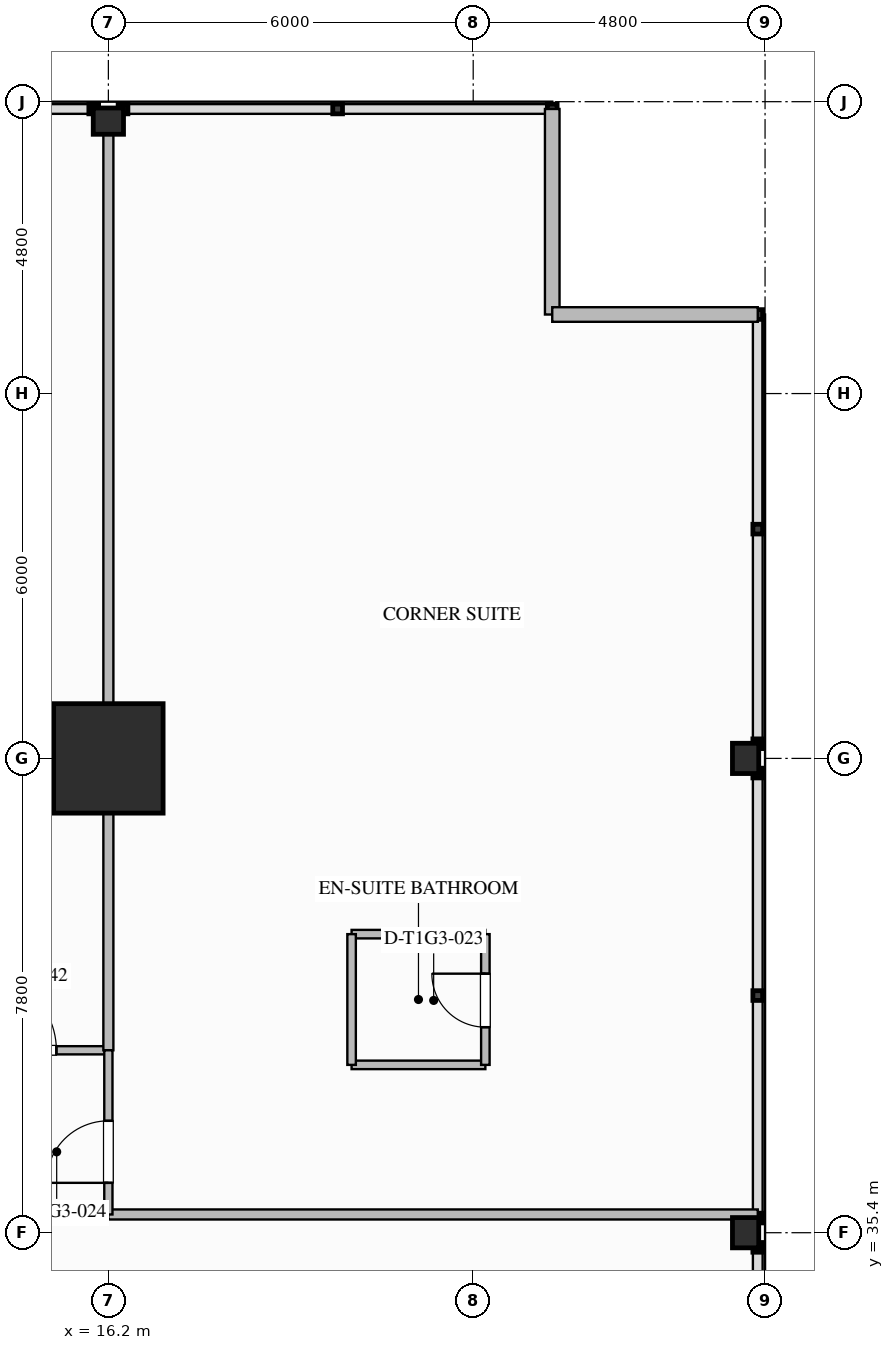
"""IFC4 building model, lengths in metres.
Left out: names, types, materials, properties, quantities, classifications, styles, units other than length and angle.
Written with IfcOpenShell. Run it as: python <this file> out.ifc"""

import sys

from ifc_helpers import new_model, si_unit, direction, frame, frame_2d, origin, origin_2d, place, context, subcontext, project, spatial, rectangle, i_section, extrude, element, fill, save


model = new_model("IFC4")
c1 = context("Model", 3, precision=1e-05, world=origin(), true_north=direction((0.0, 1.0)))
c2 = subcontext(c1, "Body", "Model", "MODEL_VIEW")
j1 = project(units=[si_unit("LENGTHUNIT", "METRE"), si_unit("PLANEANGLEUNIT", "RADIAN")], contexts=[c1])
p1 = place(None, origin())
s1 = spatial("IfcSite", under=j1, at=p1, CompositionType="ELEMENT")
p2 = place(p1, origin())
s2 = spatial("IfcBuilding", under=s1, at=p2, CompositionType="ELEMENT")
p3 = place(p2, frame((0.0, 0.0, 54.2)))
s3 = spatial("IfcBuildingStorey", under=s2, at=p3, CompositionType="ELEMENT", Elevation=54.2)
p4 = place(p3, frame((16.2, 43.2, 0.0), z_axis=(0.0, 0.0, 1.0), x_axis=(1.0, 0.0, 0.0)))
e1 = element("IfcColumn", 1, at=p4, inside=s3, PredefinedType="COLUMN", context=c2, shape_type="SweptSolid", body=[
    extrude(rectangle(XDim=1.8, YDim=1.8, at=origin_2d()), origin(), (0.0, 0.0, 1.0), 3.5),
])
for number, where, z_axis, x_axis in (
    (2, (26.68, 35.4, 0.0), (0.0, 0.0, 1.0), (1.0, 0.0, 0.0)),
    (3, (26.68, 43.2, 0.0), (0.0, 0.0, 1.0), (1.0, 0.0, 0.0)),
    (4, (16.2, 53.68, 0.0), (0.0, 0.0, 1.0), (0.0, 1.0, 0.0)),
):
    element("IfcColumn", number, at=place(p3, frame(where, z_axis=z_axis, x_axis=x_axis)), inside=s3, PredefinedType="COLUMN", context=c2, shape_type="SweptSolid", body=[
        extrude(i_section(OverallWidth=0.432, OverallDepth=0.498, WebThickness=0.056, FlangeThickness=0.089, FilletRadius=0.03, at=origin_2d()), origin(), (0.0, 0.0, 1.0), 3.497),
    ])
for number, where, z_axis, x_axis in (
    (5, (23.5, 53.88, 0.0), (0.0, 0.0, 1.0), (0.0, -1.0, 0.0)),
    (6, (23.5, 50.5, 0.0), (0.0, 0.0, 1.0), (1.0, 0.0, 0.0)),
):
    element("IfcWall", number, at=place(p3, frame(where, z_axis=z_axis, x_axis=x_axis)), inside=s3, PredefinedType="STANDARD", context=c2, shape_type="SweptSolid", body=[
        extrude(rectangle(XDim=3.38, YDim=0.24, at=frame_2d((1.69, 0.0))), origin(), (0.0, 0.0, 1.0), 3.24),
    ])
p5 = place(p3, frame((-16.2, 38.4, 0.0), z_axis=(0.0, 0.0, 1.0), x_axis=(1.0, 0.0, 0.0)))
e7 = element("IfcWall", 7, at=p5, inside=s3, PredefinedType="PARTITIONING", context=c2, shape_type="SweptSolid", body=[
    extrude(rectangle(XDim=32.4, YDim=0.135, at=frame_2d((16.2, 0.0))), origin(), (0.0, 0.0, 1.0), 3.24),
])
p6 = place(p5, frame((4.095, 0.0, 0.0)))
e8 = element("IfcOpeningElement", 8, at=p6, cuts=e7, PredefinedType="OPENING", context=c2, shape_type="SweptSolid", body=[
    extrude(rectangle(XDim=1.26, YDim=2.2, at=frame_2d((0.63, 1.1))), frame((0.0, 0.077, 0.0), z_axis=(0.0, -1.0, 0.0), x_axis=(1.0, 0.0, 0.0)), (0.0, 0.0, 1.0), 0.155),
])
p7 = place(p5, frame((7.875, 0.0, 0.0)))
e9 = element("IfcOpeningElement", 9, at=p7, cuts=e7, PredefinedType="OPENING", context=c2, shape_type="SweptSolid", body=[
    extrude(rectangle(XDim=1.26, YDim=2.2, at=frame_2d((0.63, 1.1))), frame((0.0, 0.077, 0.0), z_axis=(0.0, -1.0, 0.0), x_axis=(1.0, 0.0, 0.0)), (0.0, 0.0, 1.0), 0.155),
])
p8 = place(p5, frame((15.69, 0.0, 0.0)))
e10 = element("IfcOpeningElement", 10, at=p8, cuts=e7, PredefinedType="OPENING", context=c2, shape_type="SweptSolid", body=[
    extrude(rectangle(XDim=1.02, YDim=2.15, at=frame_2d((0.51, 1.075))), frame((0.0, 0.077, 0.0), z_axis=(0.0, -1.0, 0.0), x_axis=(1.0, 0.0, 0.0)), (0.0, 0.0, 1.0), 0.155),
])
p9 = place(p5, frame((21.645, 0.0, 0.0)))
e11 = element("IfcOpeningElement", 11, at=p9, cuts=e7, PredefinedType="OPENING", context=c2, shape_type="SweptSolid", body=[
    extrude(rectangle(XDim=1.26, YDim=2.2, at=frame_2d((0.63, 1.1))), frame((0.0, 0.077, 0.0), z_axis=(0.0, -1.0, 0.0), x_axis=(1.0, 0.0, 0.0)), (0.0, 0.0, 1.0), 0.155),
])
p10 = place(p5, frame((30.285, 0.0, 0.0)))
e12 = element("IfcOpeningElement", 12, at=p10, cuts=e7, PredefinedType="OPENING", context=c2, shape_type="SweptSolid", body=[
    extrude(rectangle(XDim=1.26, YDim=2.2, at=frame_2d((0.63, 1.1))), frame((0.0, 0.077, 0.0), z_axis=(0.0, -1.0, 0.0), x_axis=(1.0, 0.0, 0.0)), (0.0, 0.0, 1.0), 0.155),
])
p11 = place(p3, frame((11.35, 35.7, 0.0), z_axis=(0.0, 0.0, 1.0), x_axis=(1.0, 0.0, 0.0)))
e13 = element("IfcWall", 13, at=p11, inside=s3, PredefinedType="PARTITIONING", context=c2, shape_type="SweptSolid", body=[
    extrude(rectangle(XDim=4.85, YDim=0.135, at=frame_2d((2.425, 0.0))), origin(), (0.0, 0.0, 1.0), 3.24),
])
p12 = place(p3, frame((16.2, 38.4, 0.0), z_axis=(0.0, 0.0, 1.0), x_axis=(0.0, 1.0, 0.0)))
e14 = element("IfcWall", 14, at=p12, inside=s3, PredefinedType="PARTITIONING", context=c2, shape_type="SweptSolid", body=[
    extrude(rectangle(XDim=15.48, YDim=0.165, at=frame_2d((7.74, 0.0))), origin(), (0.0, 0.0, 1.0), 2.298),
])
p13 = place(p3, frame((16.2, 35.7, 0.0), z_axis=(0.0, 0.0, 1.0), x_axis=(1.0, 0.0, 0.0)))
e15 = element("IfcWall", 15, at=p13, inside=s3, PredefinedType="PARTITIONING", context=c2, shape_type="SweptSolid", body=[
    extrude(rectangle(XDim=10.68, YDim=0.165, at=frame_2d((5.34, 0.0))), origin(), (0.0, 0.0, 1.0), 2.298),
])
p14 = place(p3, frame((16.2, 35.7, 0.0), z_axis=(0.0, 0.0, 1.0), x_axis=(0.0, 1.0, 0.0)))
e16 = element("IfcWall", 16, at=p14, inside=s3, PredefinedType="PARTITIONING", context=c2, shape_type="SweptSolid", body=[
    extrude(rectangle(XDim=2.7, YDim=0.135, at=frame_2d((1.35, 0.0))), origin(), (0.0, 0.0, 1.0), 2.298),
])
p15 = place(p14, frame((0.52, 0.0, 0.0)))
e17 = element("IfcOpeningElement", 17, at=p15, cuts=e16, PredefinedType="OPENING", context=c2, shape_type="SweptSolid", body=[
    extrude(rectangle(XDim=1.02, YDim=2.15, at=frame_2d((0.51, 1.075))), frame((0.0, 0.077, 0.0), z_axis=(0.0, -1.0, 0.0), x_axis=(1.0, 0.0, 0.0)), (0.0, 0.0, 1.0), 0.155),
])
for number, where, z_axis, x_axis in (
    (18, (20.2, 38.16, 0.0), (0.0, 0.0, 1.0), (1.0, 0.0, 0.0)),
    (19, (20.2, 40.31, 0.0), (0.0, 0.0, 1.0), (1.0, 0.0, 0.0)),
):
    element("IfcWall", number, at=place(p3, frame(where, z_axis=z_axis, x_axis=x_axis)), inside=s3, PredefinedType="PLUMBINGWALL", context=c2, shape_type="SweptSolid", body=[
        extrude(rectangle(XDim=2.2, YDim=0.14, at=frame_2d((1.1, 0.0))), origin(), (0.0, 0.0, 1.0), 3.24),
    ])
p16 = place(p3, frame((20.2, 38.16, 0.0), z_axis=(0.0, 0.0, 1.0), x_axis=(0.0, 1.0, 0.0)))
e20 = element("IfcWall", 20, at=p16, inside=s3, PredefinedType="PLUMBINGWALL", context=c2, shape_type="SweptSolid", body=[
    extrude(rectangle(XDim=2.15, YDim=0.14, at=frame_2d((1.075, 0.0))), origin(), (0.0, 0.0, 1.0), 3.24),
])
p17 = place(p3, frame((22.4, 38.16, 0.0), z_axis=(0.0, 0.0, 1.0), x_axis=(0.0, 1.0, 0.0)))
e21 = element("IfcWall", 21, at=p17, inside=s3, PredefinedType="PLUMBINGWALL", context=c2, shape_type="SweptSolid", body=[
    extrude(rectangle(XDim=2.15, YDim=0.14, at=frame_2d((1.075, 0.0))), origin(), (0.0, 0.0, 1.0), 3.24),
])
p18 = place(p17, frame((0.62, 0.0, 0.0)))
e22 = element("IfcOpeningElement", 22, at=p18, cuts=e21, PredefinedType="OPENING", context=c2, shape_type="SweptSolid", body=[
    extrude(rectangle(XDim=0.88, YDim=2.1, at=frame_2d((0.44, 1.05))), frame((0.0, 0.08, 0.0), z_axis=(0.0, -1.0, 0.0), x_axis=(1.0, 0.0, 0.0)), (0.0, 0.0, 1.0), 0.16),
])
p19 = place(p18, origin())
e23 = element("IfcDoor", 23, at=p19, inside=s3, OperationType="SINGLE_SWING_RIGHT", PredefinedType="DOOR", context=c2, shape_type="SweptSolid", body=[
    extrude(rectangle(XDim=0.88, YDim=2.1, at=frame_2d((0.44, 1.05))), frame((0.0, 0.025, 0.0), z_axis=(0.0, -1.0, 0.0), x_axis=(1.0, 0.0, 0.0)), (0.0, 0.0, 1.0), 0.05),
])
fill(e22, e23)
p20 = place(p15, origin())
e24 = element("IfcDoor", 24, at=p20, inside=s3, OperationType="SINGLE_SWING_LEFT", PredefinedType="DOOR", context=c2, shape_type="SweptSolid", body=[
    extrude(rectangle(XDim=1.02, YDim=2.15, at=frame_2d((0.51, 1.075))), frame((0.0, 0.025, 0.0), z_axis=(0.0, -1.0, 0.0), x_axis=(1.0, 0.0, 0.0)), (0.0, 0.0, 1.0), 0.05),
])
fill(e17, e24)
p21 = place(p10, origin())
e25 = element("IfcDoor", 25, at=p21, inside=s3, OperationType="SINGLE_SWING_LEFT", PredefinedType="DOOR", context=c2, shape_type="SweptSolid", body=[
    extrude(rectangle(XDim=1.26, YDim=2.2, at=frame_2d((0.63, 1.1))), frame((0.0, 0.025, 0.0), z_axis=(0.0, -1.0, 0.0), x_axis=(1.0, 0.0, 0.0)), (0.0, 0.0, 1.0), 0.05),
])
fill(e12, e25)
save(model, sys.argv[1])
